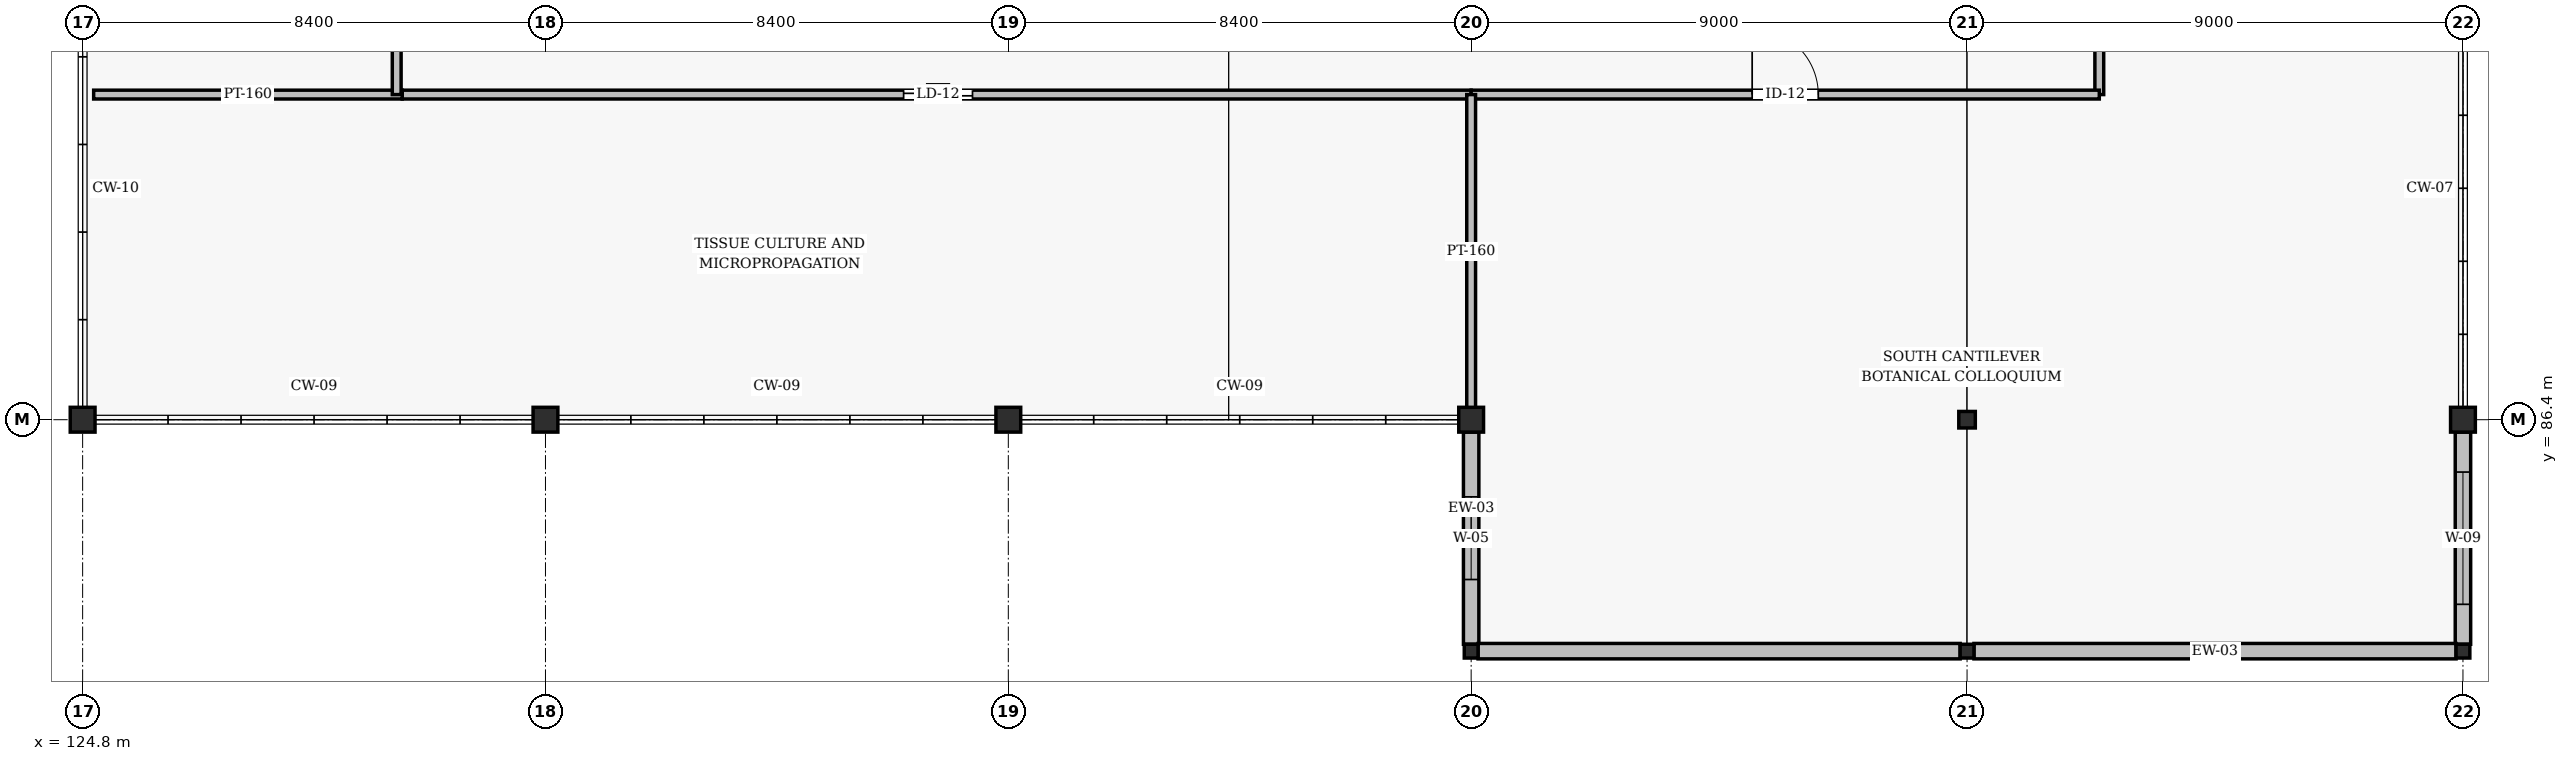
"""IFC4 building model, lengths in metres.
Left out: names, types, materials, properties, quantities, classifications, styles, units other than length and angle.
Written with IfcOpenShell. Run it as: python <this file> out.ifc"""

import sys

from ifc_helpers import new_model, si_unit, direction, frame, frame_2d, origin, origin_2d, place, context, subcontext, project, spatial, rectangle, hollow_rectangle, i_section, extrude, element, fill, save


model = new_model("IFC4")
c1 = context("Model", 3, precision=1e-05, world=origin(), true_north=direction((0.0, 1.0)))
c2 = subcontext(c1, "Body", "Model", "MODEL_VIEW")
j1 = project(units=[si_unit("LENGTHUNIT", "METRE"), si_unit("PLANEANGLEUNIT", "RADIAN")], contexts=[c1])
p1 = place(None, origin())
s1 = spatial("IfcSite", under=j1, at=p1, CompositionType="ELEMENT")
p2 = place(p1, origin())
s2 = spatial("IfcBuilding", under=s1, at=p2, CompositionType="ELEMENT")
p3 = place(p2, frame((0.0, 0.0, 43.2)))
s3 = spatial("IfcBuildingStorey", under=s2, at=p3, CompositionType="ELEMENT", Elevation=43.2)
for number, where, z_axis, x_axis in (
    (1, (124.8, 86.4, 0.0), (0.0, 0.0, 1.0), (1.0, 0.0, 0.0)),
    (2, (133.2, 86.4, 0.0), (0.0, 0.0, 1.0), (1.0, 0.0, 0.0)),
    (3, (141.6, 86.4, 0.0), (0.0, 0.0, 1.0), (1.0, 0.0, 0.0)),
):
    element("IfcColumn", number, at=place(p3, frame(where, z_axis=z_axis, x_axis=x_axis)), inside=s3, PredefinedType="COLUMN", context=c2, shape_type="SweptSolid", body=[
        extrude(hollow_rectangle(XDim=0.45, YDim=0.45, WallThickness=0.018, InnerFilletRadius=0.018, OuterFilletRadius=0.036, at=origin_2d()), origin(), (0.0, 0.0, 1.0), 3.6),
    ])
p4 = place(p3, frame((150.0, 82.2, 0.0), z_axis=(0.0, 0.0, 1.0), x_axis=(1.0, 0.0, 0.0)))
e4 = element("IfcColumn", 4, at=p4, inside=s3, PredefinedType="COLUMN", context=c2, shape_type="SweptSolid", body=[
    extrude(i_section(OverallWidth=0.25, OverallDepth=0.25, WebThickness=0.009, FlangeThickness=0.014, FilletRadius=0.016, at=origin_2d()), origin(), (0.0, 0.0, 1.0), 3.6),
])
p5 = place(p3, frame((150.0, 86.4, 0.0), z_axis=(0.0, 0.0, 1.0), x_axis=(1.0, 0.0, 0.0)))
e5 = element("IfcColumn", 5, at=p5, inside=s3, PredefinedType="COLUMN", context=c2, shape_type="SweptSolid", body=[
    extrude(hollow_rectangle(XDim=0.45, YDim=0.45, WallThickness=0.018, InnerFilletRadius=0.018, OuterFilletRadius=0.036, at=origin_2d()), origin(), (0.0, 0.0, 1.0), 3.6),
])
p6 = place(p3, frame((159.0, 82.2, 0.0), z_axis=(0.0, 0.0, 1.0), x_axis=(1.0, 0.0, 0.0)))
e6 = element("IfcColumn", 6, at=p6, inside=s3, PredefinedType="COLUMN", context=c2, shape_type="SweptSolid", body=[
    extrude(i_section(OverallWidth=0.25, OverallDepth=0.25, WebThickness=0.009, FlangeThickness=0.014, FilletRadius=0.016, at=origin_2d()), origin(), (0.0, 0.0, 1.0), 3.6),
])
p7 = place(p3, frame((159.0, 86.4, 0.0), z_axis=(0.0, 0.0, 1.0), x_axis=(1.0, 0.0, 0.0)))
e7 = element("IfcColumn", 7, at=p7, inside=s3, PredefinedType="COLUMN", context=c2, shape_type="SweptSolid", body=[
    extrude(i_section(OverallWidth=0.3, OverallDepth=0.3, WebThickness=0.01, FlangeThickness=0.015, FilletRadius=0.018, at=origin_2d()), origin(), (0.0, 0.0, 1.0), 3.6),
])
p8 = place(p3, frame((168.0, 82.2, 0.0), z_axis=(0.0, 0.0, 1.0), x_axis=(1.0, 0.0, 0.0)))
e8 = element("IfcColumn", 8, at=p8, inside=s3, PredefinedType="COLUMN", context=c2, shape_type="SweptSolid", body=[
    extrude(i_section(OverallWidth=0.25, OverallDepth=0.25, WebThickness=0.009, FlangeThickness=0.014, FilletRadius=0.016, at=origin_2d()), origin(), (0.0, 0.0, 1.0), 3.6),
])
p9 = place(p3, frame((168.0, 86.4, 0.0), z_axis=(0.0, 0.0, 1.0), x_axis=(1.0, 0.0, 0.0)))
e9 = element("IfcColumn", 9, at=p9, inside=s3, PredefinedType="COLUMN", context=c2, shape_type="SweptSolid", body=[
    extrude(hollow_rectangle(XDim=0.45, YDim=0.45, WallThickness=0.018, InnerFilletRadius=0.018, OuterFilletRadius=0.036, at=origin_2d()), origin(), (0.0, 0.0, 1.0), 3.6),
])
p10 = place(p3, frame((168.0, 82.325, 0.0), z_axis=(0.0, 0.0, 1.0), x_axis=(0.0, 1.0, 0.0)))
e10 = element("IfcWall", 10, at=p10, inside=s3, PredefinedType="SOLIDWALL", context=c2, shape_type="SweptSolid", body=[
    extrude(rectangle(XDim=3.85, YDim=0.28, at=frame_2d((1.925, 0.0))), origin(), (0.0, 0.0, 1.0), 2.86),
])
p11 = place(p10, frame((0.725, 0.0, 0.85)))
e11 = element("IfcOpeningElement", 11, at=p11, cuts=e10, PredefinedType="OPENING", context=c2, shape_type="SweptSolid", body=[
    extrude(rectangle(XDim=2.4, YDim=1.71, at=frame_2d((1.2, 0.855))), frame((0.0, 0.15, 0.0), z_axis=(0.0, -1.0, 0.0), x_axis=(1.0, 0.0, 0.0)), (0.0, 0.0, 1.0), 0.3),
])
p12 = place(p3, frame((150.0, 86.175, 0.0), z_axis=(0.0, 0.0, 1.0), x_axis=(0.0, -1.0, 0.0)))
e12 = element("IfcWall", 12, at=p12, inside=s3, PredefinedType="SOLIDWALL", context=c2, shape_type="SweptSolid", body=[
    extrude(rectangle(XDim=3.85, YDim=0.28, at=frame_2d((1.925, 0.0))), origin(), (0.0, 0.0, 1.0), 2.86),
])
p13 = place(p12, frame((1.175, 0.0, 0.85)))
e13 = element("IfcOpeningElement", 13, at=p13, cuts=e12, PredefinedType="OPENING", context=c2, shape_type="SweptSolid", body=[
    extrude(rectangle(XDim=1.5, YDim=1.71, at=frame_2d((0.75, 0.855))), frame((0.0, 0.15, 0.0), z_axis=(0.0, -1.0, 0.0), x_axis=(1.0, 0.0, 0.0)), (0.0, 0.0, 1.0), 0.3),
])
for number, where, z_axis, x_axis in (
    (14, (150.125, 82.2, 0.0), (0.0, 0.0, 1.0), (1.0, 0.0, 0.0)),
    (15, (159.125, 82.2, 0.0), (0.0, 0.0, 1.0), (1.0, 0.0, 0.0)),
):
    element("IfcWall", number, at=place(p3, frame(where, z_axis=z_axis, x_axis=x_axis)), inside=s3, PredefinedType="SOLIDWALL", context=c2, shape_type="SweptSolid", body=[
        extrude(rectangle(XDim=8.75, YDim=0.28, at=frame_2d((4.375, 0.0))), origin(), (0.0, 0.0, 1.0), 2.562),
    ])
p14 = place(p3, frame((161.4, 92.3, 0.0), z_axis=(0.0, 0.0, 1.0), x_axis=(0.0, 1.0, 0.0)))
e16 = element("IfcWall", 16, at=p14, inside=s3, PredefinedType="PARTITIONING", context=c2, shape_type="SweptSolid", body=[
    extrude(rectangle(XDim=14.1, YDim=0.16, at=frame_2d((7.05, 0.0))), origin(), (0.0, 0.0, 1.0), 2.758),
])
p15 = place(p14, frame((6.5, 0.0, 0.0)))
e17 = element("IfcOpeningElement", 17, at=p15, cuts=e16, PredefinedType="OPENING", context=c2, shape_type="SweptSolid", body=[
    extrude(rectangle(XDim=1.08, YDim=2.08, at=frame_2d((0.54, 1.04))), frame((0.0, 0.09, 0.0), z_axis=(0.0, -1.0, 0.0), x_axis=(1.0, 0.0, 0.0)), (0.0, 0.0, 1.0), 0.18),
])
p16 = place(p3, frame((130.6, 92.3, 0.0), z_axis=(0.0, 0.0, 1.0), x_axis=(1.0, 0.0, 0.0)))
e18 = element("IfcWall", 18, at=p16, inside=s3, PredefinedType="PARTITIONING", context=c2, shape_type="SweptSolid", body=[
    extrude(rectangle(XDim=19.4, YDim=0.16, at=frame_2d((9.7, 0.0))), origin(), (0.0, 0.0, 1.0), 2.854),
])
p17 = place(p16, frame((9.1, 0.0, 0.0)))
e19 = element("IfcOpeningElement", 19, at=p17, cuts=e18, PredefinedType="OPENING", context=c2, shape_type="SweptSolid", body=[
    extrude(rectangle(XDim=1.25, YDim=2.12, at=frame_2d((0.625, 1.06))), frame((0.0, 0.09, 0.0), z_axis=(0.0, -1.0, 0.0), x_axis=(1.0, 0.0, 0.0)), (0.0, 0.0, 1.0), 0.18),
])
p18 = place(p3, frame((150.0, 92.3, 0.0), z_axis=(0.0, 0.0, 1.0), x_axis=(1.0, 0.0, 0.0)))
e20 = element("IfcWall", 20, at=p18, inside=s3, PredefinedType="PARTITIONING", context=c2, shape_type="SweptSolid", body=[
    extrude(rectangle(XDim=11.4, YDim=0.16, at=frame_2d((5.7, 0.0))), origin(), (0.0, 0.0, 1.0), 2.854),
])
p19 = place(p18, frame((5.1, 0.0, 0.0)))
e21 = element("IfcOpeningElement", 21, at=p19, cuts=e20, PredefinedType="OPENING", context=c2, shape_type="SweptSolid", body=[
    extrude(rectangle(XDim=1.2, YDim=2.08, at=frame_2d((0.6, 1.04))), frame((0.0, 0.09, 0.0), z_axis=(0.0, -1.0, 0.0), x_axis=(1.0, 0.0, 0.0)), (0.0, 0.0, 1.0), 0.18),
])
p20 = place(p3, frame((125.0, 92.3, 0.0), z_axis=(0.0, 0.0, 1.0), x_axis=(1.0, 0.0, 0.0)))
e22 = element("IfcWall", 22, at=p20, inside=s3, PredefinedType="PARTITIONING", context=c2, shape_type="SweptSolid", body=[
    extrude(rectangle(XDim=5.6, YDim=0.16, at=frame_2d((2.8, 0.0))), origin(), (0.0, 0.0, 1.0), 3.354),
])
p21 = place(p3, frame((150.0, 86.6, 0.0), z_axis=(0.0, 0.0, 1.0), x_axis=(0.0, 1.0, 0.0)))
e23 = element("IfcWall", 23, at=p21, inside=s3, PredefinedType="PARTITIONING", context=c2, shape_type="SweptSolid", body=[
    extrude(rectangle(XDim=5.7, YDim=0.16, at=frame_2d((2.85, 0.0))), origin(), (0.0, 0.0, 1.0), 2.854),
])
p22 = place(p3, frame((130.5, 92.3, 0.0), z_axis=(0.0, 0.0, 1.0), x_axis=(0.0, 1.0, 0.0)))
e24 = element("IfcWall", 24, at=p22, inside=s3, PredefinedType="PARTITIONING", context=c2, shape_type="SweptSolid", body=[
    extrude(rectangle(XDim=14.2, YDim=0.16, at=frame_2d((7.1, 0.0))), origin(), (0.0, 0.0, 1.0), 2.858),
])
p23 = place(p22, frame((6.55, 0.0, 0.0)))
e25 = element("IfcOpeningElement", 25, at=p23, cuts=e24, PredefinedType="OPENING", context=c2, shape_type="SweptSolid", body=[
    extrude(rectangle(XDim=1.14, YDim=2.12, at=frame_2d((0.57, 1.06))), frame((0.0, 0.09, 0.0), z_axis=(0.0, -1.0, 0.0), x_axis=(1.0, 0.0, 0.0)), (0.0, 0.0, 1.0), 0.18),
])
p24 = place(p11, origin())
e26 = element("IfcWindow", 26, at=p24, inside=s3, PartitioningType="SINGLE_PANEL", PredefinedType="WINDOW", context=c2, shape_type="SweptSolid", body=[
    extrude(rectangle(XDim=2.4, YDim=1.71, at=frame_2d((1.2, 0.855))), frame((0.0, 0.03, 0.0), z_axis=(0.0, -1.0, 0.0), x_axis=(1.0, 0.0, 0.0)), (0.0, 0.0, 1.0), 0.06),
])
fill(e11, e26)
p25 = place(p13, origin())
e27 = element("IfcWindow", 27, at=p25, inside=s3, PartitioningType="SINGLE_PANEL", PredefinedType="WINDOW", context=c2, shape_type="SweptSolid", body=[
    extrude(rectangle(XDim=1.5, YDim=1.71, at=frame_2d((0.75, 0.855))), frame((0.0, 0.03, 0.0), z_axis=(0.0, -1.0, 0.0), x_axis=(1.0, 0.0, 0.0)), (0.0, 0.0, 1.0), 0.06),
])
fill(e13, e27)
p26 = place(p17, origin())
e28 = element("IfcDoor", 28, at=p26, inside=s3, OperationType="SINGLE_SWING_LEFT", PredefinedType="DOOR", context=c2, shape_type="SweptSolid", body=[
    extrude(rectangle(XDim=1.25, YDim=2.12, at=frame_2d((0.625, 1.06))), frame((0.0, 0.025, 0.0), z_axis=(0.0, -1.0, 0.0), x_axis=(1.0, 0.0, 0.0)), (0.0, 0.0, 1.0), 0.05),
])
fill(e19, e28)
p27 = place(p19, origin())
e29 = element("IfcDoor", 29, at=p27, inside=s3, OperationType="SINGLE_SWING_LEFT", PredefinedType="DOOR", context=c2, shape_type="SweptSolid", body=[
    extrude(rectangle(XDim=1.2, YDim=2.08, at=frame_2d((0.6, 1.04))), frame((0.0, 0.025, 0.0), z_axis=(0.0, -1.0, 0.0), x_axis=(1.0, 0.0, 0.0)), (0.0, 0.0, 1.0), 0.05),
])
fill(e21, e29)
save(model, sys.argv[1])
